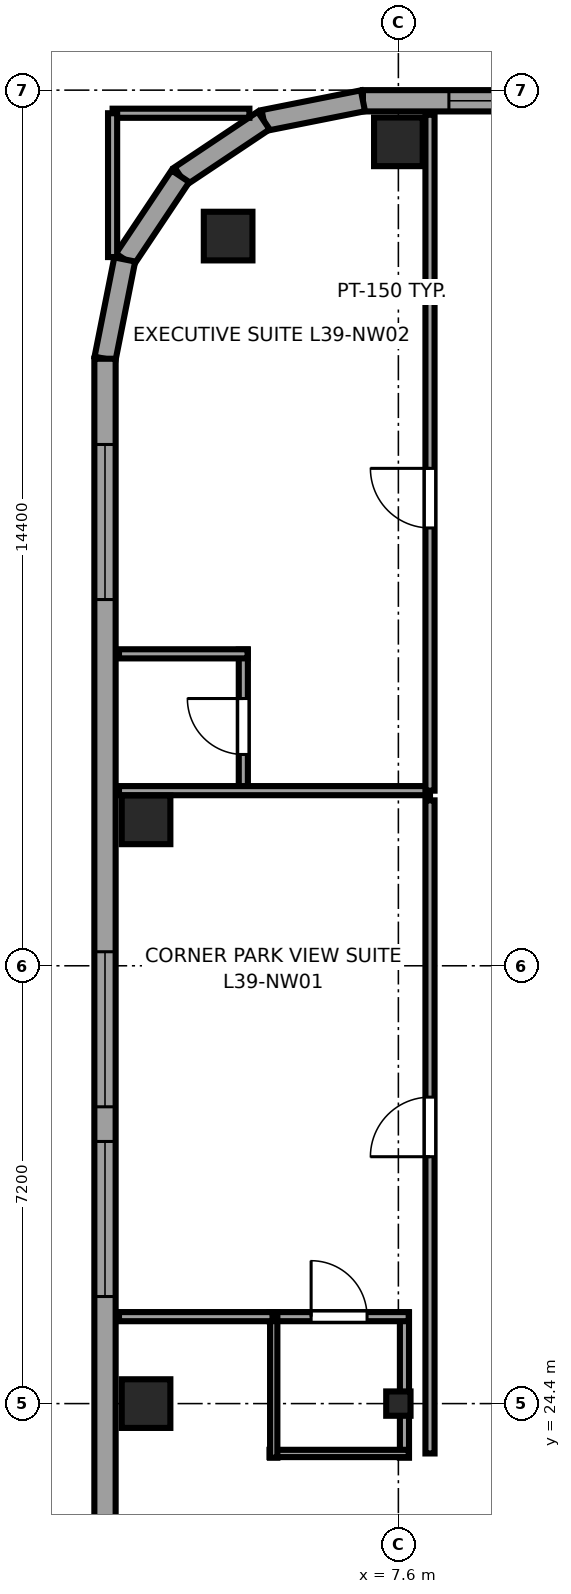
"""IFC4 building model, lengths in metres.
Left out: names, types, materials, properties, quantities, classifications, styles, units other than length and angle.
Written with IfcOpenShell. Run it as: python <this file> out.ifc"""

import sys

from ifc_helpers import new_model, si_unit, direction, frame, frame_2d, origin, origin_2d, place, context, subcontext, project, spatial, rectangle, i_section, extrude, source, transform, mapped, element, fill, save


model = new_model("IFC4")
c1 = context("Model", 3, precision=1e-05, world=origin(), true_north=direction((0.0, 1.0)))
c2 = subcontext(c1, "Body", "Model", "MODEL_VIEW")
j1 = project(units=[si_unit("LENGTHUNIT", "METRE"), si_unit("PLANEANGLEUNIT", "RADIAN")], contexts=[c1])
p1 = place(None, origin())
s1 = spatial("IfcSite", under=j1, at=p1, CompositionType="ELEMENT")
p2 = place(p1, origin())
s2 = spatial("IfcBuilding", under=s1, at=p2, CompositionType="ELEMENT")
p3 = place(p2, frame((0.0, 0.0, 150.6)))
s3 = spatial("IfcBuildingStorey", under=s2, at=p3, CompositionType="ELEMENT", Elevation=150.6)
m1 = source(origin(), c2, "Body", "SweptSolid", [
    extrude(rectangle(XDim=0.8, YDim=0.8, at=origin_2d()), origin(), (0.0, 0.0, 1.0), 3.55),
])
p4 = place(p3, frame((3.45, 24.4, 0.0), z_axis=(0.0, 0.0, 1.0), x_axis=(1.0, 0.0, 0.0)))
e1 = element("IfcColumn", 1, at=p4, inside=s3, PredefinedType="COLUMN", context=c2, shape_type="MappedRepresentation", body=[
    mapped(m1, transform((0.0, 0.0, 0.0), x_axis=(1.0, 0.0, 0.0), y_axis=(0.0, 1.0, 0.0), z_axis=(0.0, 0.0, 1.0), scale=1.0)),
])
m2 = source(origin(), c2, "Body", "SweptSolid", [
    extrude(i_section(OverallWidth=0.4, OverallDepth=0.4, WebThickness=0.02, FlangeThickness=0.035, at=origin_2d()), origin(), (0.0, 0.0, 1.0), 3.55),
])
p5 = place(p3, frame((7.6, 24.4, 0.0), z_axis=(0.0, 0.0, 1.0), x_axis=(1.0, 0.0, 0.0)))
e2 = element("IfcColumn", 2, at=p5, inside=s3, PredefinedType="COLUMN", context=c2, shape_type="MappedRepresentation", body=[
    mapped(m2, transform((0.0, 0.0, 0.0), x_axis=(1.0, 0.0, 0.0), y_axis=(0.0, 1.0, 0.0), z_axis=(0.0, 0.0, 1.0), scale=1.0)),
])
for number, where, z_axis, x_axis in (
    (3, (4.8, 43.6, 0.0), (0.0, 0.0, 1.0), (1.0, 0.0, 0.0)),
    (4, (7.6, 45.15, 0.0), (0.0, 0.0, 1.0), (1.0, 0.0, 0.0)),
    (5, (3.45, 34.0, 0.0), (0.0, 0.0, 1.0), (1.0, 0.0, 0.0)),
):
    element("IfcColumn", number, at=place(p3, frame(where, z_axis=z_axis, x_axis=x_axis)), inside=s3, PredefinedType="COLUMN", context=c2, shape_type="MappedRepresentation", body=[
        mapped(m1, transform((0.0, 0.0, 0.0), x_axis=(1.0, 0.0, 0.0), y_axis=(0.0, 1.0, 0.0), z_axis=(0.0, 0.0, 1.0), scale=1.0)),
    ])
p6 = place(p3, frame((49.983, 45.825, 0.0), z_axis=(0.0, 0.0, 1.0), x_axis=(-1.0, 0.0, 0.0)))
e6 = element("IfcWall", 6, at=p6, inside=s3, PredefinedType="SOLIDWALL", context=c2, shape_type="SweptSolid", body=[
    extrude(rectangle(XDim=42.966, YDim=0.35, at=frame_2d((21.483, 0.0))), origin(), (0.0, 0.0, 1.0), 3.37),
])
p7 = place(p6, frame((1.413, 0.0, 0.68)))
e7 = element("IfcOpeningElement", 7, at=p7, cuts=e6, PredefinedType="OPENING", context=c2, shape_type="SweptSolid", body=[
    extrude(rectangle(XDim=2.55, YDim=1.92, at=frame_2d((1.275, 0.96))), frame((0.0, 0.185, 0.0), z_axis=(0.0, -1.0, 0.0), x_axis=(1.0, 0.0, 0.0)), (0.0, 0.0, 1.0), 0.37),
])
p8 = place(p6, frame((9.766, 0.0, 0.68)))
e8 = element("IfcOpeningElement", 8, at=p8, cuts=e6, PredefinedType="OPENING", context=c2, shape_type="SweptSolid", body=[
    extrude(rectangle(XDim=2.55, YDim=1.92, at=frame_2d((1.275, 0.96))), frame((0.0, 0.185, 0.0), z_axis=(0.0, -1.0, 0.0), x_axis=(1.0, 0.0, 0.0)), (0.0, 0.0, 1.0), 0.37),
])
p9 = place(p6, frame((13.943, 0.0, 0.68)))
e9 = element("IfcOpeningElement", 9, at=p9, cuts=e6, PredefinedType="OPENING", context=c2, shape_type="SweptSolid", body=[
    extrude(rectangle(XDim=2.55, YDim=1.92, at=frame_2d((1.275, 0.96))), frame((0.0, 0.185, 0.0), z_axis=(0.0, -1.0, 0.0), x_axis=(1.0, 0.0, 0.0)), (0.0, 0.0, 1.0), 0.37),
])
p10 = place(p6, frame((18.12, 0.0, 0.68)))
e10 = element("IfcOpeningElement", 10, at=p10, cuts=e6, PredefinedType="OPENING", context=c2, shape_type="SweptSolid", body=[
    extrude(rectangle(XDim=2.55, YDim=1.92, at=frame_2d((1.275, 0.96))), frame((0.0, 0.185, 0.0), z_axis=(0.0, -1.0, 0.0), x_axis=(1.0, 0.0, 0.0)), (0.0, 0.0, 1.0), 0.37),
])
p11 = place(p6, frame((22.296, 0.0, 0.68)))
e11 = element("IfcOpeningElement", 11, at=p11, cuts=e6, PredefinedType="OPENING", context=c2, shape_type="SweptSolid", body=[
    extrude(rectangle(XDim=2.55, YDim=1.92, at=frame_2d((1.275, 0.96))), frame((0.0, 0.185, 0.0), z_axis=(0.0, -1.0, 0.0), x_axis=(1.0, 0.0, 0.0)), (0.0, 0.0, 1.0), 0.37),
])
p12 = place(p6, frame((26.473, 0.0, 0.68)))
e12 = element("IfcOpeningElement", 12, at=p12, cuts=e6, PredefinedType="OPENING", context=c2, shape_type="SweptSolid", body=[
    extrude(rectangle(XDim=2.55, YDim=1.92, at=frame_2d((1.275, 0.96))), frame((0.0, 0.185, 0.0), z_axis=(0.0, -1.0, 0.0), x_axis=(1.0, 0.0, 0.0)), (0.0, 0.0, 1.0), 0.37),
])
p13 = place(p6, frame((30.649, 0.0, 0.68)))
e13 = element("IfcOpeningElement", 13, at=p13, cuts=e6, PredefinedType="OPENING", context=c2, shape_type="SweptSolid", body=[
    extrude(rectangle(XDim=2.55, YDim=1.92, at=frame_2d((1.275, 0.96))), frame((0.0, 0.185, 0.0), z_axis=(0.0, -1.0, 0.0), x_axis=(1.0, 0.0, 0.0)), (0.0, 0.0, 1.0), 0.37),
])
p14 = place(p6, frame((34.826, 0.0, 0.68)))
e14 = element("IfcOpeningElement", 14, at=p14, cuts=e6, PredefinedType="OPENING", context=c2, shape_type="SweptSolid", body=[
    extrude(rectangle(XDim=2.55, YDim=1.92, at=frame_2d((1.275, 0.96))), frame((0.0, 0.185, 0.0), z_axis=(0.0, -1.0, 0.0), x_axis=(1.0, 0.0, 0.0)), (0.0, 0.0, 1.0), 0.37),
])
p15 = place(p6, frame((39.002, 0.0, 0.68)))
e15 = element("IfcOpeningElement", 15, at=p15, cuts=e6, PredefinedType="OPENING", context=c2, shape_type="SweptSolid", body=[
    extrude(rectangle(XDim=2.55, YDim=1.92, at=frame_2d((1.275, 0.96))), frame((0.0, 0.185, 0.0), z_axis=(0.0, -1.0, 0.0), x_axis=(1.0, 0.0, 0.0)), (0.0, 0.0, 1.0), 0.37),
])
p16 = place(p3, frame((7.017, 45.825, 0.0), z_axis=(0.0, 0.0, 1.0), x_axis=(-0.980788844421, -0.195072403631, 0.0)))
e16 = element("IfcWall", 16, at=p16, inside=s3, PredefinedType="SOLIDWALL", context=c2, shape_type="SweptSolid", body=[
    extrude(rectangle(XDim=1.665, YDim=0.35, at=frame_2d((0.832, 0.0))), origin(), (0.0, 0.0, 1.0), 3.37),
])
for number, where, z_axis, x_axis in (
    (17, (5.385, 45.5, 0.0), (0.0, 0.0, 1.0), (-0.832, -0.556, 0.0)),
    (18, (4.015, 44.585, 0.0), (0.0, 0.0, 1.0), (-0.556, -0.831, 0.0)),
):
    element("IfcWall", number, at=place(p3, frame(where, z_axis=z_axis, x_axis=x_axis)), inside=s3, PredefinedType="SOLIDWALL", context=c2, shape_type="SweptSolid", body=[
        extrude(rectangle(XDim=1.647, YDim=0.35, at=frame_2d((0.824, 0.0))), origin(), (0.0, 0.0, 1.0), 2.832),
    ])
p17 = place(p3, frame((3.1, 43.216, 0.0), z_axis=(0.0, 0.0, 1.0), x_axis=(-0.195044345786, -0.980794424524, 0.0)))
e19 = element("IfcWall", 19, at=p17, inside=s3, PredefinedType="SOLIDWALL", context=c2, shape_type="SweptSolid", body=[
    extrude(rectangle(XDim=1.665, YDim=0.35, at=frame_2d((0.833, 0.0))), origin(), (0.0, 0.0, 1.0), 3.37),
])
p18 = place(p3, frame((2.775, 41.583, 0.0), z_axis=(0.0, 0.0, 1.0), x_axis=(0.0, -1.0, 0.0)))
e20 = element("IfcWall", 20, at=p18, inside=s3, PredefinedType="SOLIDWALL", context=c2, shape_type="SweptSolid", body=[
    extrude(rectangle(XDim=34.566, YDim=0.35, at=frame_2d((17.283, 0.0))), origin(), (0.0, 0.0, 1.0), 3.37),
])
p19 = place(p18, frame((1.41, 0.0, 0.68)))
e21 = element("IfcOpeningElement", 21, at=p19, cuts=e20, PredefinedType="OPENING", context=c2, shape_type="SweptSolid", body=[
    extrude(rectangle(XDim=2.55, YDim=1.92, at=frame_2d((1.275, 0.96))), frame((0.0, 0.185, 0.0), z_axis=(0.0, -1.0, 0.0), x_axis=(1.0, 0.0, 0.0)), (0.0, 0.0, 1.0), 0.37),
])
p20 = place(p18, frame((9.752, 0.0, 0.68)))
e22 = element("IfcOpeningElement", 22, at=p20, cuts=e20, PredefinedType="OPENING", context=c2, shape_type="SweptSolid", body=[
    extrude(rectangle(XDim=2.55, YDim=1.92, at=frame_2d((1.275, 0.96))), frame((0.0, 0.185, 0.0), z_axis=(0.0, -1.0, 0.0), x_axis=(1.0, 0.0, 0.0)), (0.0, 0.0, 1.0), 0.37),
])
p21 = place(p18, frame((12.872, 0.0, 0.68)))
e23 = element("IfcOpeningElement", 23, at=p21, cuts=e20, PredefinedType="OPENING", context=c2, shape_type="SweptSolid", body=[
    extrude(rectangle(XDim=2.55, YDim=1.92, at=frame_2d((1.275, 0.96))), frame((0.0, 0.185, 0.0), z_axis=(0.0, -1.0, 0.0), x_axis=(1.0, 0.0, 0.0)), (0.0, 0.0, 1.0), 0.37),
])
p22 = place(p18, frame((21.714, 0.0, 0.68)))
e24 = element("IfcOpeningElement", 24, at=p22, cuts=e20, PredefinedType="OPENING", context=c2, shape_type="SweptSolid", body=[
    extrude(rectangle(XDim=2.55, YDim=1.92, at=frame_2d((1.275, 0.96))), frame((0.0, 0.185, 0.0), z_axis=(0.0, -1.0, 0.0), x_axis=(1.0, 0.0, 0.0)), (0.0, 0.0, 1.0), 0.37),
])
p23 = place(p18, frame((26.435, 0.0, 0.68)))
e25 = element("IfcOpeningElement", 25, at=p23, cuts=e20, PredefinedType="OPENING", context=c2, shape_type="SweptSolid", body=[
    extrude(rectangle(XDim=2.55, YDim=1.92, at=frame_2d((1.275, 0.96))), frame((0.0, 0.185, 0.0), z_axis=(0.0, -1.0, 0.0), x_axis=(1.0, 0.0, 0.0)), (0.0, 0.0, 1.0), 0.37),
])
p24 = place(p18, frame((30.055, 0.0, 0.68)))
e26 = element("IfcOpeningElement", 26, at=p24, cuts=e20, PredefinedType="OPENING", context=c2, shape_type="SweptSolid", body=[
    extrude(rectangle(XDim=2.55, YDim=1.92, at=frame_2d((1.275, 0.96))), frame((0.0, 0.185, 0.0), z_axis=(0.0, -1.0, 0.0), x_axis=(1.0, 0.0, 0.0)), (0.0, 0.0, 1.0), 0.37),
])
p25 = place(p3, frame((7.7, 23.51, 0.0), z_axis=(0.0, 0.0, 1.0), x_axis=(0.0, 1.0, 0.0)))
e27 = element("IfcWall", 27, at=p25, inside=s3, PredefinedType="PARTITIONING", context=c2, shape_type="SweptSolid", body=[
    extrude(rectangle(XDim=2.39, YDim=0.15, at=frame_2d((1.195, 0.0))), origin(), (0.0, 0.0, 1.0), 2.16),
])
p26 = place(p3, frame((5.48, 23.58, 0.0), z_axis=(0.0, 0.0, 1.0), x_axis=(1.0, 0.0, 0.0)))
e28 = element("IfcWall", 28, at=p26, inside=s3, PredefinedType="PLUMBINGWALL", context=c2, shape_type="SweptSolid", body=[
    extrude(rectangle(XDim=2.29, YDim=0.12, at=frame_2d((1.145, 0.0))), origin(), (0.0, 0.0, 1.0), 3.37),
])
p27 = place(p3, frame((5.48, 25.83, 0.0), z_axis=(0.0, 0.0, 1.0), x_axis=(1.0, 0.0, 0.0)))
e29 = element("IfcWall", 29, at=p27, inside=s3, PredefinedType="PARTITIONING", context=c2, shape_type="SweptSolid", body=[
    extrude(rectangle(XDim=2.29, YDim=0.15, at=frame_2d((1.145, 0.0))), origin(), (0.0, 0.0, 1.0), 3.37),
])
p28 = place(p27, frame((0.685, 0.0, 0.0)))
e30 = element("IfcOpeningElement", 30, at=p28, cuts=e29, PredefinedType="OPENING", context=c2, shape_type="SweptSolid", body=[
    extrude(rectangle(XDim=0.92, YDim=2.01, at=frame_2d((0.46, 1.005))), frame((0.0, 0.085, 0.0), z_axis=(0.0, -1.0, 0.0), x_axis=(1.0, 0.0, 0.0)), (0.0, 0.0, 1.0), 0.17),
])
p29 = place(p3, frame((5.55, 23.51, 0.0), z_axis=(0.0, 0.0, 1.0), x_axis=(0.0, 1.0, 0.0)))
e31 = element("IfcWall", 31, at=p29, inside=s3, PredefinedType="PLUMBINGWALL", context=c2, shape_type="SweptSolid", body=[
    extrude(rectangle(XDim=2.39, YDim=0.12, at=frame_2d((1.195, 0.0))), origin(), (0.0, 0.0, 1.0), 3.37),
])
p30 = place(p3, frame((5.05, 34.41, 0.0), z_axis=(0.0, 0.0, 1.0), x_axis=(0.0, 1.0, 0.0)))
e32 = element("IfcWall", 32, at=p30, inside=s3, PredefinedType="PARTITIONING", context=c2, shape_type="SweptSolid", body=[
    extrude(rectangle(XDim=2.39, YDim=0.15, at=frame_2d((1.195, 0.0))), origin(), (0.0, 0.0, 1.0), 3.37),
])
p31 = place(p30, frame((0.665, 0.0, 0.0)))
e33 = element("IfcOpeningElement", 33, at=p31, cuts=e32, PredefinedType="OPENING", context=c2, shape_type="SweptSolid", body=[
    extrude(rectangle(XDim=0.92, YDim=2.01, at=frame_2d((0.46, 1.005))), frame((0.0, 0.085, 0.0), z_axis=(0.0, -1.0, 0.0), x_axis=(1.0, 0.0, 0.0)), (0.0, 0.0, 1.0), 0.17),
])
p32 = place(p3, frame((3.005, 34.48, 0.0), z_axis=(0.0, 0.0, 1.0), x_axis=(1.0, 0.0, 0.0)))
e34 = element("IfcWall", 34, at=p32, inside=s3, PredefinedType="PARTITIONING", context=c2, shape_type="SweptSolid", body=[
    extrude(rectangle(XDim=5.115, YDim=0.15, at=frame_2d((2.558, 0.0))), origin(), (0.0, 0.0, 1.0), 3.37),
])
p33 = place(p3, frame((3.005, 36.73, 0.0), z_axis=(0.0, 0.0, 1.0), x_axis=(1.0, 0.0, 0.0)))
e35 = element("IfcWall", 35, at=p33, inside=s3, PredefinedType="PARTITIONING", context=c2, shape_type="SweptSolid", body=[
    extrude(rectangle(XDim=2.115, YDim=0.15, at=frame_2d((1.058, 0.0))), origin(), (0.0, 0.0, 1.0), 3.37),
])
p34 = place(p3, frame((8.12, 23.58, 0.0), z_axis=(0.0, 0.0, 1.0), x_axis=(0.0, 1.0, 0.0)))
e36 = element("IfcWall", 36, at=p34, inside=s3, PredefinedType="PARTITIONING", context=c2, shape_type="SweptSolid", body=[
    extrude(rectangle(XDim=10.74, YDim=0.15, at=frame_2d((5.37, 0.0))), origin(), (0.0, 0.0, 1.0), 3.37),
])
p35 = place(p34, frame((4.88, 0.0, 0.0)))
e37 = element("IfcOpeningElement", 37, at=p35, cuts=e36, PredefinedType="OPENING", context=c2, shape_type="SweptSolid", body=[
    extrude(rectangle(XDim=0.98, YDim=2.12, at=frame_2d((0.49, 1.06))), frame((0.0, 0.085, 0.0), z_axis=(0.0, -1.0, 0.0), x_axis=(1.0, 0.0, 0.0)), (0.0, 0.0, 1.0), 0.17),
])
p36 = place(p3, frame((3.005, 25.83, 0.0), z_axis=(0.0, 0.0, 1.0), x_axis=(1.0, 0.0, 0.0)))
e38 = element("IfcWall", 38, at=p36, inside=s3, PredefinedType="PARTITIONING", context=c2, shape_type="SweptSolid", body=[
    extrude(rectangle(XDim=2.525, YDim=0.15, at=frame_2d((1.263, 0.0))), origin(), (0.0, 0.0, 1.0), 3.37),
])
p37 = place(p3, frame((8.12, 34.48, 0.0), z_axis=(0.0, 0.0, 1.0), x_axis=(0.0, 1.0, 0.0)))
e39 = element("IfcWall", 39, at=p37, inside=s3, PredefinedType="PARTITIONING", context=c2, shape_type="SweptSolid", body=[
    extrude(rectangle(XDim=11.115, YDim=0.15, at=frame_2d((5.558, 0.0))), origin(), (0.0, 0.0, 1.0), 3.37),
])
p38 = place(p37, frame((4.32, 0.0, 0.0)))
e40 = element("IfcOpeningElement", 40, at=p38, cuts=e39, PredefinedType="OPENING", context=c2, shape_type="SweptSolid", body=[
    extrude(rectangle(XDim=0.98, YDim=2.12, at=frame_2d((0.49, 1.06))), frame((0.0, 0.085, 0.0), z_axis=(0.0, -1.0, 0.0), x_axis=(1.0, 0.0, 0.0)), (0.0, 0.0, 1.0), 0.17),
])
p39 = place(p3, frame((2.9, 45.62, 0.0), z_axis=(0.0, 0.0, 1.0), x_axis=(1.0, 0.0, 0.0)))
e41 = element("IfcWall", 41, at=p39, inside=s3, PredefinedType="PARTITIONING", context=c2, shape_type="SweptSolid", body=[
    extrude(rectangle(XDim=2.25, YDim=0.15, at=frame_2d((1.125, 0.0))), origin(), (0.0, 0.0, 1.0), 3.37),
])
p40 = place(p3, frame((2.9, 43.255, 0.0), z_axis=(0.0, 0.0, 1.0), x_axis=(0.0, 1.0, 0.0)))
e42 = element("IfcWall", 42, at=p40, inside=s3, PredefinedType="PARTITIONING", context=c2, shape_type="SweptSolid", body=[
    extrude(rectangle(XDim=2.365, YDim=0.15, at=frame_2d((1.183, 0.0))), origin(), (0.0, 0.0, 1.0), 3.37),
])
m3 = source(origin(), c2, "Body", "SweptSolid", [
    extrude(rectangle(XDim=2.55, YDim=1.92, at=frame_2d((1.275, 0.96))), frame((0.0, 0.09, 0.0), z_axis=(0.0, -1.0, 0.0), x_axis=(1.0, 0.0, 0.0)), (0.0, 0.0, 1.0), 0.06),
])
p41 = place(p15, origin())
e43 = element("IfcWindow", 43, at=p41, inside=s3, PartitioningType="TRIPLE_PANEL_HORIZONTAL", PredefinedType="WINDOW", context=c2, shape_type="MappedRepresentation", body=[
    mapped(m3, transform((0.0, 0.0, 0.0), x_axis=(1.0, 0.0, 0.0), y_axis=(0.0, 1.0, 0.0), z_axis=(0.0, 0.0, 1.0), scale=1.0)),
])
fill(e15, e43)
p42 = place(p19, origin())
e44 = element("IfcWindow", 44, at=p42, inside=s3, PartitioningType="TRIPLE_PANEL_HORIZONTAL", PredefinedType="WINDOW", context=c2, shape_type="MappedRepresentation", body=[
    mapped(m3, transform((0.0, 0.0, 0.0), x_axis=(1.0, 0.0, 0.0), y_axis=(0.0, 1.0, 0.0), z_axis=(0.0, 0.0, 1.0), scale=1.0)),
])
fill(e21, e44)
p43 = place(p20, origin())
e45 = element("IfcWindow", 45, at=p43, inside=s3, PartitioningType="TRIPLE_PANEL_HORIZONTAL", PredefinedType="WINDOW", context=c2, shape_type="MappedRepresentation", body=[
    mapped(m3, transform((0.0, 0.0, 0.0), x_axis=(1.0, 0.0, 0.0), y_axis=(0.0, 1.0, 0.0), z_axis=(0.0, 0.0, 1.0), scale=1.0)),
])
fill(e22, e45)
p44 = place(p21, origin())
e46 = element("IfcWindow", 46, at=p44, inside=s3, PartitioningType="TRIPLE_PANEL_HORIZONTAL", PredefinedType="WINDOW", context=c2, shape_type="MappedRepresentation", body=[
    mapped(m3, transform((0.0, 0.0, 0.0), x_axis=(1.0, 0.0, 0.0), y_axis=(0.0, 1.0, 0.0), z_axis=(0.0, 0.0, 1.0), scale=1.0)),
])
fill(e23, e46)
m4 = source(origin(), c2, "Body", "SweptSolid", [
    extrude(rectangle(XDim=0.92, YDim=2.01, at=frame_2d((0.46, 1.005))), frame((0.0, 0.025, 0.0), z_axis=(0.0, -1.0, 0.0), x_axis=(1.0, 0.0, 0.0)), (0.0, 0.0, 1.0), 0.05),
])
p45 = place(p28, origin())
e47 = element("IfcDoor", 47, at=p45, inside=s3, OperationType="SINGLE_SWING_LEFT", PredefinedType="DOOR", context=c2, shape_type="MappedRepresentation", body=[
    mapped(m4, transform((0.0, 0.0, 0.0), x_axis=(1.0, 0.0, 0.0), y_axis=(0.0, 1.0, 0.0), z_axis=(0.0, 0.0, 1.0), scale=1.0)),
])
fill(e30, e47)
p46 = place(p31, origin())
e48 = element("IfcDoor", 48, at=p46, inside=s3, OperationType="SINGLE_SWING_RIGHT", PredefinedType="DOOR", context=c2, shape_type="MappedRepresentation", body=[
    mapped(m4, transform((0.0, 0.0, 0.0), x_axis=(1.0, 0.0, 0.0), y_axis=(0.0, 1.0, 0.0), z_axis=(0.0, 0.0, 1.0), scale=1.0)),
])
fill(e33, e48)
m5 = source(origin(), c2, "Body", "SweptSolid", [
    extrude(rectangle(XDim=0.98, YDim=2.12, at=frame_2d((0.49, 1.06))), frame((0.0, 0.025, 0.0), z_axis=(0.0, -1.0, 0.0), x_axis=(1.0, 0.0, 0.0)), (0.0, 0.0, 1.0), 0.05),
])
p47 = place(p35, origin())
e49 = element("IfcDoor", 49, at=p47, inside=s3, OperationType="SINGLE_SWING_LEFT", PredefinedType="DOOR", context=c2, shape_type="MappedRepresentation", body=[
    mapped(m5, transform((0.0, 0.0, 0.0), x_axis=(1.0, 0.0, 0.0), y_axis=(0.0, 1.0, 0.0), z_axis=(0.0, 0.0, 1.0), scale=1.0)),
])
fill(e37, e49)
p48 = place(p38, origin())
e50 = element("IfcDoor", 50, at=p48, inside=s3, OperationType="SINGLE_SWING_RIGHT", PredefinedType="DOOR", context=c2, shape_type="MappedRepresentation", body=[
    mapped(m5, transform((0.0, 0.0, 0.0), x_axis=(1.0, 0.0, 0.0), y_axis=(0.0, 1.0, 0.0), z_axis=(0.0, 0.0, 1.0), scale=1.0)),
])
fill(e40, e50)
save(model, sys.argv[1])
